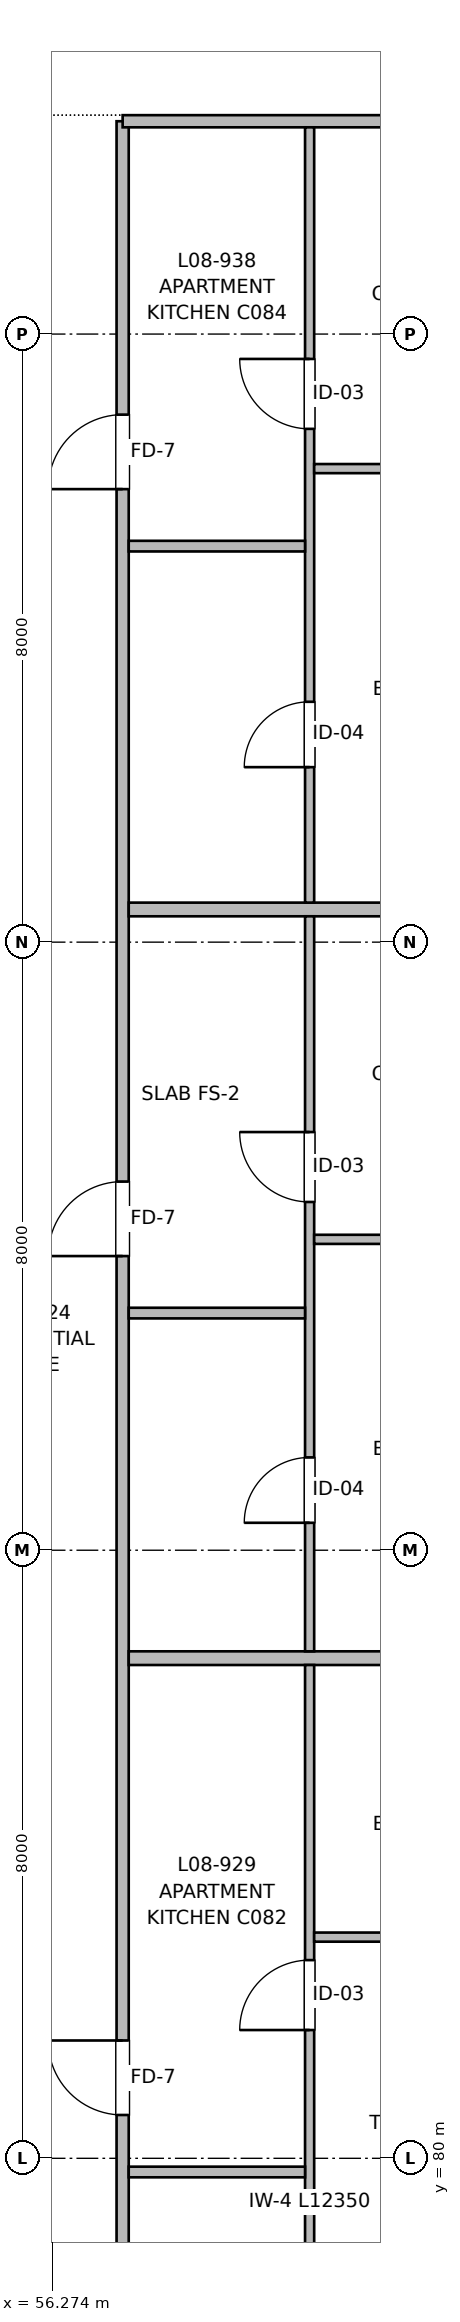
"""IFC4 building model, lengths in metres.
Left out: names, types, materials, properties, quantities, classifications, styles, units other than length and angle.
Written with IfcOpenShell. Run it as: python <this file> out.ifc"""

import sys

from ifc_helpers import new_model, si_unit, direction, frame, frame_2d, origin, place, context, subcontext, project, spatial, rectangle, extrude, element, fill, save


model = new_model("IFC4")
c1 = context("Model", 3, precision=1e-05, world=origin(), true_north=direction((0.0, 1.0)))
c2 = subcontext(c1, "Body", "Model", "MODEL_VIEW")
j1 = project(units=[si_unit("LENGTHUNIT", "METRE"), si_unit("PLANEANGLEUNIT", "RADIAN")], contexts=[c1])
p1 = place(None, origin())
s1 = spatial("IfcSite", under=j1, at=p1, CompositionType="ELEMENT")
p2 = place(p1, origin())
s2 = spatial("IfcBuilding", under=s1, at=p2, CompositionType="ELEMENT")
p3 = place(p2, frame((0.0, 0.0, 26.56)))
s3 = spatial("IfcBuildingStorey", under=s2, at=p3, CompositionType="ELEMENT", Elevation=26.56)
p4 = place(p3, frame((57.2, 61.96, 0.0), z_axis=(0.0, 0.0, 1.0), x_axis=(0.0, 1.0, 0.0)))
e1 = element("IfcWall", 1, at=p4, inside=s3, PredefinedType="PARTITIONING", context=c2, shape_type="SweptSolid", body=[
    extrude(rectangle(XDim=44.84, YDim=0.16, at=frame_2d((22.42, 0.0))), origin(), (0.0, 0.0, 1.0), 2.935),
])
p5 = place(p4, frame((5.25, 0.0, 0.0)))
e2 = element("IfcOpeningElement", 2, at=p5, cuts=e1, PredefinedType="OPENING", context=c2, shape_type="SweptSolid", body=[
    extrude(rectangle(XDim=1.5, YDim=2.2, at=frame_2d((0.75, 1.1))), frame((0.0, 0.09, 0.0), z_axis=(0.0, -1.0, 0.0), x_axis=(1.0, 0.0, 0.0)), (0.0, 0.0, 1.0), 0.18),
])
p6 = place(p4, frame((18.61, 0.0, 0.0)))
e3 = element("IfcOpeningElement", 3, at=p6, cuts=e1, PredefinedType="OPENING", context=c2, shape_type="SweptSolid", body=[
    extrude(rectangle(XDim=0.98, YDim=2.15, at=frame_2d((0.49, 1.075))), frame((0.0, 0.09, 0.0), z_axis=(0.0, -1.0, 0.0), x_axis=(1.0, 0.0, 0.0)), (0.0, 0.0, 1.0), 0.18),
])
p7 = place(p4, frame((29.91, 0.0, 0.0)))
e4 = element("IfcOpeningElement", 4, at=p7, cuts=e1, PredefinedType="OPENING", context=c2, shape_type="SweptSolid", body=[
    extrude(rectangle(XDim=0.98, YDim=2.15, at=frame_2d((0.49, 1.075))), frame((0.0, 0.09, 0.0), z_axis=(0.0, -1.0, 0.0), x_axis=(1.0, 0.0, 0.0)), (0.0, 0.0, 1.0), 0.18),
])
p8 = place(p4, frame((40.0, 0.0, 0.0)))
e5 = element("IfcOpeningElement", 5, at=p8, cuts=e1, PredefinedType="OPENING", context=c2, shape_type="SweptSolid", body=[
    extrude(rectangle(XDim=0.98, YDim=2.15, at=frame_2d((0.49, 1.075))), frame((0.0, 0.09, 0.0), z_axis=(0.0, -1.0, 0.0), x_axis=(1.0, 0.0, 0.0)), (0.0, 0.0, 1.0), 0.18),
])
p9 = place(p3, frame((57.2, 106.8, 0.0), z_axis=(0.0, 0.0, 1.0), x_axis=(1.0, 0.0, 0.0)))
e6 = element("IfcWall", 6, at=p9, inside=s3, PredefinedType="PARTITIONING", context=c2, shape_type="SweptSolid", body=[
    extrude(rectangle(XDim=24.14, YDim=0.16, at=frame_2d((12.07, 0.0))), origin(), (0.0, 0.0, 1.0), 2.935),
])
p10 = place(p9, frame((19.575, 0.0, 0.0)))
e7 = element("IfcOpeningElement", 7, at=p10, cuts=e6, PredefinedType="OPENING", context=c2, shape_type="SweptSolid", body=[
    extrude(rectangle(XDim=1.05, YDim=2.15, at=frame_2d((0.525, 1.075))), frame((0.0, 0.09, 0.0), z_axis=(0.0, -1.0, 0.0), x_axis=(1.0, 0.0, 0.0)), (0.0, 0.0, 1.0), 0.18),
])
p11 = place(p9, frame((8.995, 0.0, 0.0)))
e8 = element("IfcOpeningElement", 8, at=p11, cuts=e6, PredefinedType="OPENING", context=c2, shape_type="SweptSolid", body=[
    extrude(rectangle(XDim=0.98, YDim=2.15, at=frame_2d((0.49, 1.075))), frame((0.0, 0.09, 0.0), z_axis=(0.0, -1.0, 0.0), x_axis=(1.0, 0.0, 0.0)), (0.0, 0.0, 1.0), 0.18),
])
p12 = place(p3, frame((57.28, 86.58, 0.0), z_axis=(0.0, 0.0, 1.0), x_axis=(1.0, 0.0, 0.0)))
e9 = element("IfcWall", 9, at=p12, inside=s3, PredefinedType="PARTITIONING", context=c2, shape_type="SweptSolid", body=[
    extrude(rectangle(XDim=6.6, YDim=0.18, at=frame_2d((3.3, 0.0))), origin(), (0.0, 0.0, 1.0), 2.935),
])
p13 = place(p3, frame((57.28, 96.43, 0.0), z_axis=(0.0, 0.0, 1.0), x_axis=(1.0, 0.0, 0.0)))
e10 = element("IfcWall", 10, at=p13, inside=s3, PredefinedType="PARTITIONING", context=c2, shape_type="SweptSolid", body=[
    extrude(rectangle(XDim=14.217, YDim=0.18, at=frame_2d((7.109, 0.0))), origin(), (0.0, 0.0, 1.0), 2.935),
])
p14 = place(p3, frame((59.66, 74.14, 0.0), z_axis=(0.0, 0.0, 1.0), x_axis=(0.0, 1.0, 0.0)))
e11 = element("IfcWall", 11, at=p14, inside=s3, PredefinedType="PARTITIONING", context=c2, shape_type="SweptSolid", body=[
    extrude(rectangle(XDim=12.35, YDim=0.12, at=frame_2d((6.175, 0.0))), origin(), (0.0, 0.0, 1.0), 2.935),
])
p15 = place(p14, frame((2.158, 0.0, 0.0)))
e12 = element("IfcOpeningElement", 12, at=p15, cuts=e11, PredefinedType="OPENING", context=c2, shape_type="SweptSolid", body=[
    extrude(rectangle(XDim=0.86, YDim=2.1, at=frame_2d((0.43, 1.05))), frame((0.0, 0.07, 0.0), z_axis=(0.0, -1.0, 0.0), x_axis=(1.0, 0.0, 0.0)), (0.0, 0.0, 1.0), 0.14),
])
p16 = place(p14, frame((7.548, 0.0, 0.0)))
e13 = element("IfcOpeningElement", 13, at=p16, cuts=e11, PredefinedType="OPENING", context=c2, shape_type="SweptSolid", body=[
    extrude(rectangle(XDim=0.92, YDim=2.1, at=frame_2d((0.46, 1.05))), frame((0.0, 0.07, 0.0), z_axis=(0.0, -1.0, 0.0), x_axis=(1.0, 0.0, 0.0)), (0.0, 0.0, 1.0), 0.14),
])
p17 = place(p3, frame((57.28, 79.82, 0.0), z_axis=(0.0, 0.0, 1.0), x_axis=(1.0, 0.0, 0.0)))
e14 = element("IfcWall", 14, at=p17, inside=s3, PredefinedType="PARTITIONING", context=c2, shape_type="SweptSolid", body=[
    extrude(rectangle(XDim=2.32, YDim=0.14, at=frame_2d((1.16, 0.0))), origin(), (0.0, 0.0, 1.0), 2.53),
])
p18 = place(p3, frame((59.72, 82.91, 0.0), z_axis=(0.0, 0.0, 1.0), x_axis=(1.0, 0.0, 0.0)))
e15 = element("IfcWall", 15, at=p18, inside=s3, PredefinedType="PARTITIONING", context=c2, shape_type="SweptSolid", body=[
    extrude(rectangle(XDim=4.16, YDim=0.12, at=frame_2d((2.08, 0.0))), origin(), (0.0, 0.0, 1.0), 2.935),
])
p19 = place(p18, frame((1.64, 0.0, 0.0)))
e16 = element("IfcOpeningElement", 16, at=p19, cuts=e15, PredefinedType="OPENING", context=c2, shape_type="SweptSolid", body=[
    extrude(rectangle(XDim=0.88, YDim=2.1, at=frame_2d((0.44, 1.05))), frame((0.0, 0.07, 0.0), z_axis=(0.0, -1.0, 0.0), x_axis=(1.0, 0.0, 0.0)), (0.0, 0.0, 1.0), 0.14),
])
p20 = place(p3, frame((59.66, 86.67, 0.0), z_axis=(0.0, 0.0, 1.0), x_axis=(0.0, 1.0, 0.0)))
e17 = element("IfcWall", 17, at=p20, inside=s3, PredefinedType="PARTITIONING", context=c2, shape_type="SweptSolid", body=[
    extrude(rectangle(XDim=9.67, YDim=0.12, at=frame_2d((4.835, 0.0))), origin(), (0.0, 0.0, 1.0), 2.935),
])
p21 = place(p20, frame((1.691, 0.0, 0.0)))
e18 = element("IfcOpeningElement", 18, at=p21, cuts=e17, PredefinedType="OPENING", context=c2, shape_type="SweptSolid", body=[
    extrude(rectangle(XDim=0.86, YDim=2.1, at=frame_2d((0.43, 1.05))), frame((0.0, 0.07, 0.0), z_axis=(0.0, -1.0, 0.0), x_axis=(1.0, 0.0, 0.0)), (0.0, 0.0, 1.0), 0.14),
])
p22 = place(p20, frame((5.912, 0.0, 0.0)))
e19 = element("IfcOpeningElement", 19, at=p22, cuts=e17, PredefinedType="OPENING", context=c2, shape_type="SweptSolid", body=[
    extrude(rectangle(XDim=0.92, YDim=2.1, at=frame_2d((0.46, 1.05))), frame((0.0, 0.07, 0.0), z_axis=(0.0, -1.0, 0.0), x_axis=(1.0, 0.0, 0.0)), (0.0, 0.0, 1.0), 0.14),
])
p23 = place(p3, frame((57.28, 91.12, 0.0), z_axis=(0.0, 0.0, 1.0), x_axis=(1.0, 0.0, 0.0)))
e20 = element("IfcWall", 20, at=p23, inside=s3, PredefinedType="PARTITIONING", context=c2, shape_type="SweptSolid", body=[
    extrude(rectangle(XDim=2.32, YDim=0.14, at=frame_2d((1.16, 0.0))), origin(), (0.0, 0.0, 1.0), 2.935),
])
p24 = place(p3, frame((59.72, 92.09, 0.0), z_axis=(0.0, 0.0, 1.0), x_axis=(1.0, 0.0, 0.0)))
e21 = element("IfcWall", 21, at=p24, inside=s3, PredefinedType="PARTITIONING", context=c2, shape_type="SweptSolid", body=[
    extrude(rectangle(XDim=7.51, YDim=0.12, at=frame_2d((3.755, 0.0))), origin(), (0.0, 0.0, 1.0), 2.935),
])
p25 = place(p24, frame((1.63, 0.0, 0.0)))
e22 = element("IfcOpeningElement", 22, at=p25, cuts=e21, PredefinedType="OPENING", context=c2, shape_type="SweptSolid", body=[
    extrude(rectangle(XDim=0.9, YDim=2.1, at=frame_2d((0.45, 1.05))), frame((0.0, 0.07, 0.0), z_axis=(0.0, -1.0, 0.0), x_axis=(1.0, 0.0, 0.0)), (0.0, 0.0, 1.0), 0.14),
])
p26 = place(p3, frame((59.66, 96.52, 0.0), z_axis=(0.0, 0.0, 1.0), x_axis=(0.0, 1.0, 0.0)))
e23 = element("IfcWall", 23, at=p26, inside=s3, PredefinedType="PARTITIONING", context=c2, shape_type="SweptSolid", body=[
    extrude(rectangle(XDim=10.2, YDim=0.12, at=frame_2d((5.1, 0.0))), origin(), (0.0, 0.0, 1.0), 2.935),
])
p27 = place(p26, frame((1.782, 0.0, 0.0)))
e24 = element("IfcOpeningElement", 24, at=p27, cuts=e23, PredefinedType="OPENING", context=c2, shape_type="SweptSolid", body=[
    extrude(rectangle(XDim=0.86, YDim=2.1, at=frame_2d((0.43, 1.05))), frame((0.0, 0.07, 0.0), z_axis=(0.0, -1.0, 0.0), x_axis=(1.0, 0.0, 0.0)), (0.0, 0.0, 1.0), 0.14),
])
p28 = place(p26, frame((6.233, 0.0, 0.0)))
e25 = element("IfcOpeningElement", 25, at=p28, cuts=e23, PredefinedType="OPENING", context=c2, shape_type="SweptSolid", body=[
    extrude(rectangle(XDim=0.92, YDim=2.1, at=frame_2d((0.46, 1.05))), frame((0.0, 0.07, 0.0), z_axis=(0.0, -1.0, 0.0), x_axis=(1.0, 0.0, 0.0)), (0.0, 0.0, 1.0), 0.14),
])
p29 = place(p3, frame((57.28, 101.21, 0.0), z_axis=(0.0, 0.0, 1.0), x_axis=(1.0, 0.0, 0.0)))
e26 = element("IfcWall", 26, at=p29, inside=s3, PredefinedType="PARTITIONING", context=c2, shape_type="SweptSolid", body=[
    extrude(rectangle(XDim=2.32, YDim=0.14, at=frame_2d((1.16, 0.0))), origin(), (0.0, 0.0, 1.0), 2.935),
])
p30 = place(p3, frame((59.72, 102.23, 0.0), z_axis=(0.0, 0.0, 1.0), x_axis=(1.0, 0.0, 0.0)))
e27 = element("IfcWall", 27, at=p30, inside=s3, PredefinedType="PARTITIONING", context=c2, shape_type="SweptSolid", body=[
    extrude(rectangle(XDim=4.19, YDim=0.12, at=frame_2d((2.095, 0.0))), origin(), (0.0, 0.0, 1.0), 2.935),
])
p31 = place(p30, frame((1.645, 0.0, 0.0)))
e28 = element("IfcOpeningElement", 28, at=p31, cuts=e27, PredefinedType="OPENING", context=c2, shape_type="SweptSolid", body=[
    extrude(rectangle(XDim=0.9, YDim=2.1, at=frame_2d((0.45, 1.05))), frame((0.0, 0.07, 0.0), z_axis=(0.0, -1.0, 0.0), x_axis=(1.0, 0.0, 0.0)), (0.0, 0.0, 1.0), 0.14),
])
p32 = place(p16, origin())
e29 = element("IfcDoor", 29, at=p32, inside=s3, OperationType="SINGLE_SWING_LEFT", PredefinedType="DOOR", context=c2, shape_type="SweptSolid", body=[
    extrude(rectangle(XDim=0.92, YDim=2.1, at=frame_2d((0.46, 1.05))), frame((0.0, 0.025, 0.0), z_axis=(0.0, -1.0, 0.0), x_axis=(1.0, 0.0, 0.0)), (0.0, 0.0, 1.0), 0.05),
])
fill(e13, e29)
p33 = place(p6, origin())
e30 = element("IfcDoor", 30, at=p33, inside=s3, OperationType="SINGLE_SWING_RIGHT", PredefinedType="DOOR", context=c2, shape_type="SweptSolid", body=[
    extrude(rectangle(XDim=0.98, YDim=2.15, at=frame_2d((0.49, 1.075))), frame((0.0, 0.025, 0.0), z_axis=(0.0, -1.0, 0.0), x_axis=(1.0, 0.0, 0.0)), (0.0, 0.0, 1.0), 0.05),
])
fill(e3, e30)
p34 = place(p21, origin())
e31 = element("IfcDoor", 31, at=p34, inside=s3, OperationType="SINGLE_SWING_LEFT", PredefinedType="DOOR", context=c2, shape_type="SweptSolid", body=[
    extrude(rectangle(XDim=0.86, YDim=2.1, at=frame_2d((0.43, 1.05))), frame((0.0, 0.025, 0.0), z_axis=(0.0, -1.0, 0.0), x_axis=(1.0, 0.0, 0.0)), (0.0, 0.0, 1.0), 0.05),
])
fill(e18, e31)
p35 = place(p22, origin())
e32 = element("IfcDoor", 32, at=p35, inside=s3, OperationType="SINGLE_SWING_RIGHT", PredefinedType="DOOR", context=c2, shape_type="SweptSolid", body=[
    extrude(rectangle(XDim=0.92, YDim=2.1, at=frame_2d((0.46, 1.05))), frame((0.0, 0.025, 0.0), z_axis=(0.0, -1.0, 0.0), x_axis=(1.0, 0.0, 0.0)), (0.0, 0.0, 1.0), 0.05),
])
fill(e19, e32)
p36 = place(p7, origin())
e33 = element("IfcDoor", 33, at=p36, inside=s3, OperationType="SINGLE_SWING_LEFT", PredefinedType="DOOR", context=c2, shape_type="SweptSolid", body=[
    extrude(rectangle(XDim=0.98, YDim=2.15, at=frame_2d((0.49, 1.075))), frame((0.0, 0.025, 0.0), z_axis=(0.0, -1.0, 0.0), x_axis=(1.0, 0.0, 0.0)), (0.0, 0.0, 1.0), 0.05),
])
fill(e4, e33)
p37 = place(p27, origin())
e34 = element("IfcDoor", 34, at=p37, inside=s3, OperationType="SINGLE_SWING_LEFT", PredefinedType="DOOR", context=c2, shape_type="SweptSolid", body=[
    extrude(rectangle(XDim=0.86, YDim=2.1, at=frame_2d((0.43, 1.05))), frame((0.0, 0.025, 0.0), z_axis=(0.0, -1.0, 0.0), x_axis=(1.0, 0.0, 0.0)), (0.0, 0.0, 1.0), 0.05),
])
fill(e24, e34)
p38 = place(p28, origin())
e35 = element("IfcDoor", 35, at=p38, inside=s3, OperationType="SINGLE_SWING_RIGHT", PredefinedType="DOOR", context=c2, shape_type="SweptSolid", body=[
    extrude(rectangle(XDim=0.92, YDim=2.1, at=frame_2d((0.46, 1.05))), frame((0.0, 0.025, 0.0), z_axis=(0.0, -1.0, 0.0), x_axis=(1.0, 0.0, 0.0)), (0.0, 0.0, 1.0), 0.05),
])
fill(e25, e35)
p39 = place(p8, origin())
e36 = element("IfcDoor", 36, at=p39, inside=s3, OperationType="SINGLE_SWING_LEFT", PredefinedType="DOOR", context=c2, shape_type="SweptSolid", body=[
    extrude(rectangle(XDim=0.98, YDim=2.15, at=frame_2d((0.49, 1.075))), frame((0.0, 0.025, 0.0), z_axis=(0.0, -1.0, 0.0), x_axis=(1.0, 0.0, 0.0)), (0.0, 0.0, 1.0), 0.05),
])
fill(e5, e36)
save(model, sys.argv[1])
